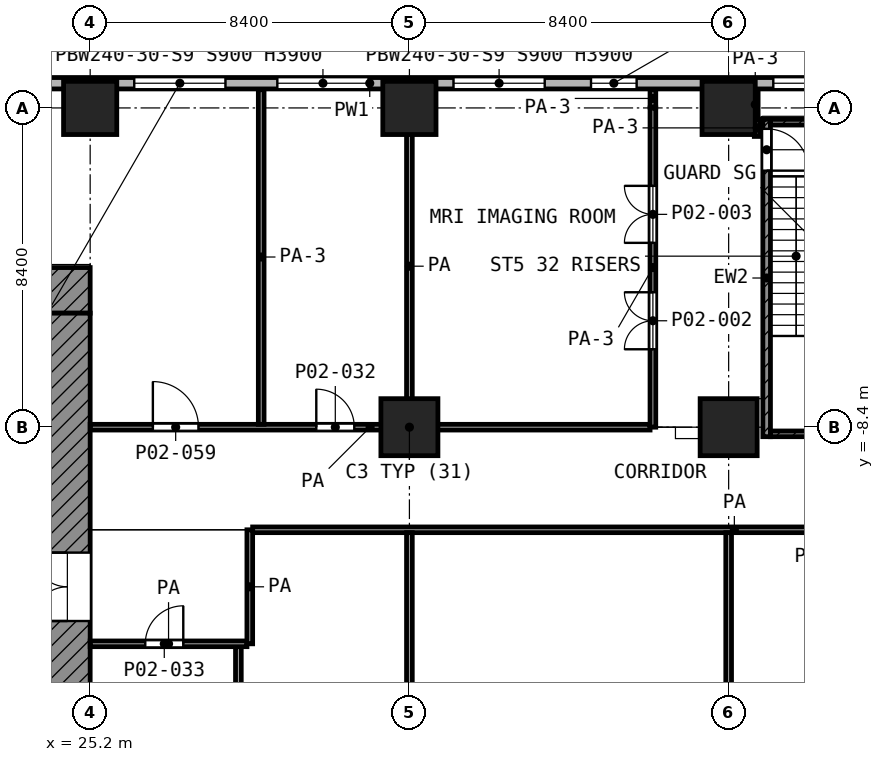
"""IFC4 building model, lengths in metres.
Left out: names, types, materials, properties, quantities, classifications, styles, units other than length and angle.
Written with IfcOpenShell. Run it as: python <this file> out.ifc"""

import sys

from ifc_helpers import new_model, si_unit, direction, frame, frame_2d, origin, origin_2d, place, context, subcontext, project, spatial, rectangle, extrude, element, fill, save


model = new_model("IFC4")
c1 = context("Model", 3, precision=1e-05, world=origin(), true_north=direction((0.0, 1.0)))
c2 = subcontext(c1, "Body", "Model", "MODEL_VIEW")
j1 = project(units=[si_unit("LENGTHUNIT", "METRE"), si_unit("PLANEANGLEUNIT", "RADIAN")], contexts=[c1])
p1 = place(None, origin())
s1 = spatial("IfcSite", under=j1, at=p1, CompositionType="ELEMENT")
p2 = place(p1, origin())
s2 = spatial("IfcBuilding", under=s1, at=p2, CompositionType="ELEMENT")
p3 = place(p2, frame((0.0, 0.0, 7.0)))
s3 = spatial("IfcBuildingStorey", under=s2, at=p3, CompositionType="ELEMENT", Elevation=7.0)
for number, where, z_axis, x_axis in (
    (1, (25.2, 0.0, 0.0), (0.0, 0.0, 1.0), (1.0, 0.0, 0.0)),
    (2, (33.6, 0.0, 0.0), (0.0, 0.0, 1.0), (1.0, 0.0, 0.0)),
    (3, (42.0, 0.0, 0.0), (0.0, 0.0, 1.0), (1.0, 0.0, 0.0)),
):
    element("IfcColumn", number, at=place(p3, frame(where, z_axis=z_axis, x_axis=x_axis)), inside=s3, PredefinedType="COLUMN", context=c2, shape_type="SweptSolid", body=[
        extrude(rectangle(XDim=1.4, YDim=1.4, at=origin_2d()), origin(), (0.0, 0.0, 1.0), 5.6),
    ])
for number, where, z_axis, x_axis in (
    (4, (33.6, -8.4, 0.0), (0.0, 0.0, 1.0), (1.0, 0.0, 0.0)),
    (5, (42.0, -8.4, 0.0), (0.0, 0.0, 1.0), (1.0, 0.0, 0.0)),
):
    element("IfcColumn", number, at=place(p3, frame(where, z_axis=z_axis, x_axis=x_axis)), inside=s3, PredefinedType="COLUMN", context=c2, shape_type="SweptSolid", body=[
        extrude(rectangle(XDim=1.5, YDim=1.5, at=origin_2d()), origin(), (0.0, 0.0, 1.0), 5.6),
    ])
p4 = place(p3, frame((59.85, 0.65, 0.0), z_axis=(0.0, 0.0, 1.0), x_axis=(-1.0, 0.0, 0.0)))
e6 = element("IfcWall", 6, at=p4, inside=s3, PredefinedType="SOLIDWALL", context=c2, shape_type="SweptSolid", body=[
    extrude(rectangle(XDim=54.588, YDim=0.3, at=frame_2d((27.294, 0.0))), origin(), (0.0, 0.0, 1.0), 5.25),
])
p5 = place(p4, frame((1.35, 0.0, 0.9)))
e7 = element("IfcOpeningElement", 7, at=p5, cuts=e6, PredefinedType="OPENING", context=c2, shape_type="SweptSolid", body=[
    extrude(rectangle(XDim=3.6, YDim=3.0, at=frame_2d((1.8, 1.5))), frame((0.0, 0.16, 0.0), z_axis=(0.0, -1.0, 0.0), x_axis=(1.0, 0.0, 0.0)), (0.0, 0.0, 1.0), 0.32),
])
p6 = place(p4, frame((5.89, 0.0, 0.9)))
e8 = element("IfcOpeningElement", 8, at=p6, cuts=e6, PredefinedType="OPENING", context=c2, shape_type="SweptSolid", body=[
    extrude(rectangle(XDim=2.4, YDim=3.0, at=frame_2d((1.2, 1.5))), frame((0.0, 0.16, 0.0), z_axis=(0.0, -1.0, 0.0), x_axis=(1.0, 0.0, 0.0)), (0.0, 0.0, 1.0), 0.32),
])
p7 = place(p4, frame((10.61, 0.0, 0.9)))
e9 = element("IfcOpeningElement", 9, at=p7, cuts=e6, PredefinedType="OPENING", context=c2, shape_type="SweptSolid", body=[
    extrude(rectangle(XDim=2.4, YDim=3.0, at=frame_2d((1.2, 1.5))), frame((0.0, 0.16, 0.0), z_axis=(0.0, -1.0, 0.0), x_axis=(1.0, 0.0, 0.0)), (0.0, 0.0, 1.0), 0.32),
])
p8 = place(p4, frame((14.275, 0.0, 0.9)))
e10 = element("IfcOpeningElement", 10, at=p8, cuts=e6, PredefinedType="OPENING", context=c2, shape_type="SweptSolid", body=[
    extrude(rectangle(XDim=2.4, YDim=3.0, at=frame_2d((1.2, 1.5))), frame((0.0, 0.16, 0.0), z_axis=(0.0, -1.0, 0.0), x_axis=(1.0, 0.0, 0.0)), (0.0, 0.0, 1.0), 0.32),
])
p9 = place(p4, frame((20.271, 0.0, 0.9)))
e11 = element("IfcOpeningElement", 11, at=p9, cuts=e6, PredefinedType="OPENING", context=c2, shape_type="SweptSolid", body=[
    extrude(rectangle(XDim=1.2, YDim=3.0, at=frame_2d((0.6, 1.5))), frame((0.0, 0.16, 0.0), z_axis=(0.0, -1.0, 0.0), x_axis=(1.0, 0.0, 0.0)), (0.0, 0.0, 1.0), 0.32),
])
p10 = place(p4, frame((22.69, 0.0, 0.9)))
e12 = element("IfcOpeningElement", 12, at=p10, cuts=e6, PredefinedType="OPENING", context=c2, shape_type="SweptSolid", body=[
    extrude(rectangle(XDim=2.4, YDim=3.0, at=frame_2d((1.2, 1.5))), frame((0.0, 0.16, 0.0), z_axis=(0.0, -1.0, 0.0), x_axis=(1.0, 0.0, 0.0)), (0.0, 0.0, 1.0), 0.32),
])
p11 = place(p4, frame((27.325, 0.0, 0.9)))
e13 = element("IfcOpeningElement", 13, at=p11, cuts=e6, PredefinedType="OPENING", context=c2, shape_type="SweptSolid", body=[
    extrude(rectangle(XDim=2.4, YDim=3.0, at=frame_2d((1.2, 1.5))), frame((0.0, 0.16, 0.0), z_axis=(0.0, -1.0, 0.0), x_axis=(1.0, 0.0, 0.0)), (0.0, 0.0, 1.0), 0.32),
])
p12 = place(p4, frame((31.09, 0.0, 0.9)))
e14 = element("IfcOpeningElement", 14, at=p12, cuts=e6, PredefinedType="OPENING", context=c2, shape_type="SweptSolid", body=[
    extrude(rectangle(XDim=2.4, YDim=3.0, at=frame_2d((1.2, 1.5))), frame((0.0, 0.16, 0.0), z_axis=(0.0, -1.0, 0.0), x_axis=(1.0, 0.0, 0.0)), (0.0, 0.0, 1.0), 0.32),
])
p13 = place(p4, frame((35.81, 0.0, 0.9)))
e15 = element("IfcOpeningElement", 15, at=p13, cuts=e6, PredefinedType="OPENING", context=c2, shape_type="SweptSolid", body=[
    extrude(rectangle(XDim=2.4, YDim=3.0, at=frame_2d((1.2, 1.5))), frame((0.0, 0.16, 0.0), z_axis=(0.0, -1.0, 0.0), x_axis=(1.0, 0.0, 0.0)), (0.0, 0.0, 1.0), 0.32),
])
p14 = place(p4, frame((39.49, 0.0, 0.9)))
e16 = element("IfcOpeningElement", 16, at=p14, cuts=e6, PredefinedType="OPENING", context=c2, shape_type="SweptSolid", body=[
    extrude(rectangle(XDim=2.4, YDim=3.0, at=frame_2d((1.2, 1.5))), frame((0.0, 0.16, 0.0), z_axis=(0.0, -1.0, 0.0), x_axis=(1.0, 0.0, 0.0)), (0.0, 0.0, 1.0), 0.32),
])
p15 = place(p4, frame((44.21, 0.0, 0.9)))
e17 = element("IfcOpeningElement", 17, at=p15, cuts=e6, PredefinedType="OPENING", context=c2, shape_type="SweptSolid", body=[
    extrude(rectangle(XDim=2.4, YDim=3.0, at=frame_2d((1.2, 1.5))), frame((0.0, 0.16, 0.0), z_axis=(0.0, -1.0, 0.0), x_axis=(1.0, 0.0, 0.0)), (0.0, 0.0, 1.0), 0.32),
])
p16 = place(p4, frame((47.55, 0.0, 0.9)))
e18 = element("IfcOpeningElement", 18, at=p16, cuts=e6, PredefinedType="OPENING", context=c2, shape_type="SweptSolid", body=[
    extrude(rectangle(XDim=3.6, YDim=3.0, at=frame_2d((1.8, 1.5))), frame((0.0, 0.16, 0.0), z_axis=(0.0, -1.0, 0.0), x_axis=(1.0, 0.0, 0.0)), (0.0, 0.0, 1.0), 0.32),
])
p17 = place(p4, frame((51.778, 0.0, 0.9)))
e19 = element("IfcOpeningElement", 19, at=p17, cuts=e6, PredefinedType="OPENING", context=c2, shape_type="SweptSolid", body=[
    extrude(rectangle(XDim=1.2, YDim=3.0, at=frame_2d((0.6, 1.5))), frame((0.0, 0.16, 0.0), z_axis=(0.0, -1.0, 0.0), x_axis=(1.0, 0.0, 0.0)), (0.0, 0.0, 1.0), 0.32),
])
p18 = place(p3, frame((4.2, -4.8, 0.0), z_axis=(0.0, 0.0, 1.0), x_axis=(1.0, 0.0, 0.0)))
e20 = element("IfcWall", 20, at=p18, inside=s3, PredefinedType="SHEAR", context=c2, shape_type="SweptSolid", body=[
    extrude(rectangle(XDim=21.0, YDim=1.2, at=frame_2d((10.5, 0.0))), origin(), (0.0, 0.0, 1.0), 5.25),
])
p19 = place(p18, frame((1.95, 0.0, 0.0)))
e21 = element("IfcOpeningElement", 21, at=p19, cuts=e20, PredefinedType="OPENING", context=c2, shape_type="SweptSolid", body=[
    extrude(rectangle(XDim=1.1, YDim=2.1, at=frame_2d((0.55, 1.05))), frame((0.0, 0.61, 0.0), z_axis=(0.0, -1.0, 0.0), x_axis=(1.0, 0.0, 0.0)), (0.0, 0.0, 1.0), 1.22),
])
p20 = place(p18, frame((17.95, 0.0, 0.0)))
e22 = element("IfcOpeningElement", 22, at=p20, cuts=e20, PredefinedType="OPENING", context=c2, shape_type="SweptSolid", body=[
    extrude(rectangle(XDim=1.1, YDim=2.1, at=frame_2d((0.55, 1.05))), frame((0.0, 0.61, 0.0), z_axis=(0.0, -1.0, 0.0), x_axis=(1.0, 0.0, 0.0)), (0.0, 0.0, 1.0), 1.22),
])
p21 = place(p3, frame((24.6, -24.0, 0.0), z_axis=(0.0, 0.0, 1.0), x_axis=(0.0, 1.0, 0.0)))
e23 = element("IfcWall", 23, at=p21, inside=s3, PredefinedType="SHEAR", context=c2, shape_type="SweptSolid", body=[
    extrude(rectangle(XDim=18.6, YDim=1.2, at=frame_2d((9.3, 0.0))), origin(), (0.0, 0.0, 1.0), 5.25),
])
p22 = place(p21, frame((10.5, 0.0, 0.0)))
e24 = element("IfcOpeningElement", 24, at=p22, cuts=e23, PredefinedType="OPENING", context=c2, shape_type="SweptSolid", body=[
    extrude(rectangle(XDim=1.8, YDim=2.1, at=frame_2d((0.9, 1.05))), frame((0.0, 0.61, 0.0), z_axis=(0.0, -1.0, 0.0), x_axis=(1.0, 0.0, 0.0)), (0.0, 0.0, 1.0), 1.22),
])
p23 = place(p3, frame((43.0, -8.65, 0.0), z_axis=(0.0, 0.0, 1.0), x_axis=(0.0, 1.0, 0.0)))
e25 = element("IfcWall", 25, at=p23, inside=s3, PredefinedType="SHEAR", context=c2, shape_type="SweptSolid", body=[
    extrude(rectangle(XDim=8.35, YDim=0.2, at=frame_2d((4.175, 0.0))), origin(), (0.0, 0.0, 1.0), 5.25),
])
p24 = place(p23, frame((7.0, 0.0, 0.0)))
e26 = element("IfcOpeningElement", 26, at=p24, cuts=e25, PredefinedType="OPENING", context=c2, shape_type="SweptSolid", body=[
    extrude(rectangle(XDim=1.1, YDim=2.1, at=frame_2d((0.55, 1.05))), frame((0.0, 0.11, 0.0), z_axis=(0.0, -1.0, 0.0), x_axis=(1.0, 0.0, 0.0)), (0.0, 0.0, 1.0), 0.22),
])
for number, where, z_axis, x_axis in (
    (27, (43.1, -0.375, 0.0), (0.0, 0.0, 1.0), (1.0, 0.0, 0.0)),
    (28, (43.1, -8.575, 0.0), (0.0, 0.0, 1.0), (1.0, 0.0, 0.0)),
):
    element("IfcWall", number, at=place(p3, frame(where, z_axis=z_axis, x_axis=x_axis)), inside=s3, PredefinedType="SHEAR", context=c2, shape_type="SweptSolid", body=[
        extrude(rectangle(XDim=2.85, YDim=0.15, at=frame_2d((1.425, 0.0))), origin(), (0.0, 0.0, 1.0), 5.25),
    ])
p25 = place(p3, frame((25.2, -14.1, 0.0), z_axis=(0.0, 0.0, 1.0), x_axis=(1.0, 0.0, 0.0)))
e29 = element("IfcWall", 29, at=p25, inside=s3, PredefinedType="PARTITIONING", context=c2, shape_type="SweptSolid", body=[
    extrude(rectangle(XDim=4.125, YDim=0.15, at=frame_2d((2.062, 0.0))), origin(), (0.0, 0.0, 1.0), 5.25),
])
p26 = place(p25, frame((1.45, 0.0, 0.0)))
e30 = element("IfcOpeningElement", 30, at=p26, cuts=e29, PredefinedType="OPENING", context=c2, shape_type="SweptSolid", body=[
    extrude(rectangle(XDim=1.0, YDim=2.1, at=frame_2d((0.5, 1.05))), frame((0.0, 0.085, 0.0), z_axis=(0.0, -1.0, 0.0), x_axis=(1.0, 0.0, 0.0)), (0.0, 0.0, 1.0), 0.17),
])
p27 = place(p3, frame((29.475, -11.1, 0.0), z_axis=(0.0, 0.0, 1.0), x_axis=(1.0, 0.0, 0.0)))
e31 = element("IfcWall", 31, at=p27, inside=s3, PredefinedType="PARTITIONING", context=c2, shape_type="SweptSolid", body=[
    extrude(rectangle(XDim=25.35, YDim=0.15, at=frame_2d((12.675, 0.0))), origin(), (0.0, 0.0, 1.0), 5.25),
])
p28 = place(p27, frame((17.375, 0.0, 0.0)))
e32 = element("IfcOpeningElement", 32, at=p28, cuts=e31, PredefinedType="OPENING", context=c2, shape_type="SweptSolid", body=[
    extrude(rectangle(XDim=1.5, YDim=2.1, at=frame_2d((0.75, 1.05))), frame((0.0, 0.085, 0.0), z_axis=(0.0, -1.0, 0.0), x_axis=(1.0, 0.0, 0.0)), (0.0, 0.0, 1.0), 0.17),
])
p29 = place(p27, frame((14.575, 0.0, 0.0)))
e33 = element("IfcOpeningElement", 33, at=p29, cuts=e31, PredefinedType="OPENING", context=c2, shape_type="SweptSolid", body=[
    extrude(rectangle(XDim=1.5, YDim=2.1, at=frame_2d((0.75, 1.05))), frame((0.0, 0.085, 0.0), z_axis=(0.0, -1.0, 0.0), x_axis=(1.0, 0.0, 0.0)), (0.0, 0.0, 1.0), 0.17),
])
p30 = place(p3, frame((25.2, -8.4, 0.0), z_axis=(0.0, 0.0, 1.0), x_axis=(1.0, 0.0, 0.0)))
e34 = element("IfcWall", 34, at=p30, inside=s3, PredefinedType="PARTITIONING", context=c2, shape_type="SweptSolid", body=[
    extrude(rectangle(XDim=14.732, YDim=0.15, at=frame_2d((7.366, 0.0))), origin(), (0.0, 0.0, 1.0), 5.25),
])
p31 = place(p30, frame((1.65, 0.0, 0.0)))
e35 = element("IfcOpeningElement", 35, at=p31, cuts=e34, PredefinedType="OPENING", context=c2, shape_type="SweptSolid", body=[
    extrude(rectangle(XDim=1.2, YDim=2.1, at=frame_2d((0.6, 1.05))), frame((0.0, 0.085, 0.0), z_axis=(0.0, -1.0, 0.0), x_axis=(1.0, 0.0, 0.0)), (0.0, 0.0, 1.0), 0.17),
])
p32 = place(p30, frame((5.95, 0.0, 0.0)))
e36 = element("IfcOpeningElement", 36, at=p32, cuts=e34, PredefinedType="OPENING", context=c2, shape_type="SweptSolid", body=[
    extrude(rectangle(XDim=1.0, YDim=2.1, at=frame_2d((0.5, 1.05))), frame((0.0, 0.085, 0.0), z_axis=(0.0, -1.0, 0.0), x_axis=(1.0, 0.0, 0.0)), (0.0, 0.0, 1.0), 0.17),
])
p33 = place(p3, frame((29.1, -22.425, 0.0), z_axis=(0.0, 0.0, 1.0), x_axis=(0.0, 1.0, 0.0)))
e37 = element("IfcWall", 37, at=p33, inside=s3, PredefinedType="PARTITIONING", context=c2, shape_type="SweptSolid", body=[
    extrude(rectangle(XDim=8.25, YDim=0.15, at=frame_2d((4.125, 0.0))), origin(), (0.0, 0.0, 1.0), 5.25),
])
p34 = place(p3, frame((29.4, -14.1, 0.0), z_axis=(0.0, 0.0, 1.0), x_axis=(0.0, 1.0, 0.0)))
e38 = element("IfcWall", 38, at=p34, inside=s3, PredefinedType="PARTITIONING", context=c2, shape_type="SweptSolid", body=[
    extrude(rectangle(XDim=3.0, YDim=0.15, at=frame_2d((1.5, 0.0))), origin(), (0.0, 0.0, 1.0), 5.25),
])
p35 = place(p3, frame((29.7, -8.325, 0.0), z_axis=(0.0, 0.0, 1.0), x_axis=(0.0, 1.0, 0.0)))
e39 = element("IfcWall", 39, at=p35, inside=s3, PredefinedType="PARTITIONING", context=c2, shape_type="SweptSolid", body=[
    extrude(rectangle(XDim=8.805, YDim=0.15, at=frame_2d((4.402, 0.0))), origin(), (0.0, 0.0, 1.0), 3.85),
])
p36 = place(p3, frame((33.6, -22.425, 0.0), z_axis=(0.0, 0.0, 1.0), x_axis=(0.0, 1.0, 0.0)))
e40 = element("IfcWall", 40, at=p36, inside=s3, PredefinedType="PARTITIONING", context=c2, shape_type="SweptSolid", body=[
    extrude(rectangle(XDim=11.25, YDim=0.15, at=frame_2d((5.625, 0.0))), origin(), (0.0, 0.0, 1.0), 5.25),
])
p37 = place(p3, frame((33.6, -8.325, 0.0), z_axis=(0.0, 0.0, 1.0), x_axis=(0.0, 1.0, 0.0)))
e41 = element("IfcWall", 41, at=p37, inside=s3, PredefinedType="PARTITIONING", context=c2, shape_type="SweptSolid", body=[
    extrude(rectangle(XDim=8.322, YDim=0.15, at=frame_2d((4.161, 0.0))), origin(), (0.0, 0.0, 1.0), 5.25),
])
p38 = place(p3, frame((40.007, -8.4, 0.0), z_axis=(0.0, 0.0, 1.0), x_axis=(0.0, 1.0, 0.0)))
e42 = element("IfcWall", 42, at=p38, inside=s3, PredefinedType="PARTITIONING", context=c2, shape_type="SweptSolid", body=[
    extrude(rectangle(XDim=8.4, YDim=0.15, at=frame_2d((4.2, 0.0))), origin(), (0.0, 0.0, 1.0), 3.85),
])
p39 = place(p38, frame((2.05, 0.0, 0.0)))
e43 = element("IfcOpeningElement", 43, at=p39, cuts=e42, PredefinedType="OPENING", context=c2, shape_type="SweptSolid", body=[
    extrude(rectangle(XDim=1.5, YDim=2.1, at=frame_2d((0.75, 1.05))), frame((0.0, 0.085, 0.0), z_axis=(0.0, -1.0, 0.0), x_axis=(1.0, 0.0, 0.0)), (0.0, 0.0, 1.0), 0.17),
])
p40 = place(p38, frame((4.85, 0.0, 0.0)))
e44 = element("IfcOpeningElement", 44, at=p40, cuts=e42, PredefinedType="OPENING", context=c2, shape_type="SweptSolid", body=[
    extrude(rectangle(XDim=1.5, YDim=2.1, at=frame_2d((0.75, 1.05))), frame((0.0, 0.085, 0.0), z_axis=(0.0, -1.0, 0.0), x_axis=(1.0, 0.0, 0.0)), (0.0, 0.0, 1.0), 0.17),
])
p41 = place(p3, frame((40.007, 0.02, 0.0), z_axis=(0.0, 0.0, 1.0), x_axis=(0.0, 1.0, 0.0)))
e45 = element("IfcWall", 45, at=p41, inside=s3, PredefinedType="PARTITIONING", context=c2, shape_type="SweptSolid", body=[
    extrude(rectangle(XDim=0.46, YDim=0.15, at=frame_2d((0.23, 0.0))), origin(), (0.0, 0.0, 1.0), 3.85),
])
p42 = place(p3, frame((42.0, -22.425, 0.0), z_axis=(0.0, 0.0, 1.0), x_axis=(0.0, 1.0, 0.0)))
e46 = element("IfcWall", 46, at=p42, inside=s3, PredefinedType="PARTITIONING", context=c2, shape_type="SweptSolid", body=[
    extrude(rectangle(XDim=11.25, YDim=0.15, at=frame_2d((5.625, 0.0))), origin(), (0.0, 0.0, 1.0), 5.25),
])
p43 = place(p3, frame((42.7, -0.3, 0.0), z_axis=(0.0, 0.0, 1.0), x_axis=(0.0, 1.0, 0.0)))
e47 = element("IfcWall", 47, at=p43, inside=s3, PredefinedType="PARTITIONING", context=c2, shape_type="SweptSolid", body=[
    extrude(rectangle(XDim=0.78, YDim=0.15, at=frame_2d((0.39, 0.0))), origin(), (0.0, 0.0, 1.0), 3.85),
])
p44 = place(p3, frame((42.75, -0.75, 0.0), z_axis=(0.0, 0.0, 1.0), x_axis=(0.0, 1.0, 0.0)))
e48 = element("IfcWall", 48, at=p44, inside=s3, PredefinedType="PARTITIONING", context=c2, shape_type="SweptSolid", body=[
    extrude(rectangle(XDim=0.45, YDim=0.15, at=frame_2d((0.225, 0.0))), origin(), (0.0, 0.0, 1.0), 3.85),
])
p45 = place(p8, origin())
e49 = element("IfcWindow", 49, at=p45, inside=s3, PartitioningType="SINGLE_PANEL", PredefinedType="WINDOW", context=c2, shape_type="SweptSolid", body=[
    extrude(rectangle(XDim=2.4, YDim=3.0, at=frame_2d((1.2, 1.5))), frame((0.0, 0.03, 0.0), z_axis=(0.0, -1.0, 0.0), x_axis=(1.0, 0.0, 0.0)), (0.0, 0.0, 1.0), 0.06),
])
fill(e10, e49)
p46 = place(p9, origin())
e50 = element("IfcWindow", 50, at=p46, inside=s3, PartitioningType="SINGLE_PANEL", PredefinedType="WINDOW", context=c2, shape_type="SweptSolid", body=[
    extrude(rectangle(XDim=1.2, YDim=3.0, at=frame_2d((0.6, 1.5))), frame((0.0, 0.03, 0.0), z_axis=(0.0, -1.0, 0.0), x_axis=(1.0, 0.0, 0.0)), (0.0, 0.0, 1.0), 0.06),
])
fill(e11, e50)
p47 = place(p10, origin())
e51 = element("IfcWindow", 51, at=p47, inside=s3, PartitioningType="SINGLE_PANEL", PredefinedType="WINDOW", context=c2, shape_type="SweptSolid", body=[
    extrude(rectangle(XDim=2.4, YDim=3.0, at=frame_2d((1.2, 1.5))), frame((0.0, 0.03, 0.0), z_axis=(0.0, -1.0, 0.0), x_axis=(1.0, 0.0, 0.0)), (0.0, 0.0, 1.0), 0.06),
])
fill(e12, e51)
p48 = place(p11, origin())
e52 = element("IfcWindow", 52, at=p48, inside=s3, PartitioningType="SINGLE_PANEL", PredefinedType="WINDOW", context=c2, shape_type="SweptSolid", body=[
    extrude(rectangle(XDim=2.4, YDim=3.0, at=frame_2d((1.2, 1.5))), frame((0.0, 0.03, 0.0), z_axis=(0.0, -1.0, 0.0), x_axis=(1.0, 0.0, 0.0)), (0.0, 0.0, 1.0), 0.06),
])
fill(e13, e52)
p49 = place(p12, origin())
e53 = element("IfcWindow", 53, at=p49, inside=s3, PartitioningType="SINGLE_PANEL", PredefinedType="WINDOW", context=c2, shape_type="SweptSolid", body=[
    extrude(rectangle(XDim=2.4, YDim=3.0, at=frame_2d((1.2, 1.5))), frame((0.0, 0.03, 0.0), z_axis=(0.0, -1.0, 0.0), x_axis=(1.0, 0.0, 0.0)), (0.0, 0.0, 1.0), 0.06),
])
fill(e14, e53)
p50 = place(p22, origin())
e54 = element("IfcDoor", 54, at=p50, inside=s3, OperationType="DOUBLE_DOOR_SINGLE_SWING", PredefinedType="DOOR", context=c2, shape_type="SweptSolid", body=[
    extrude(rectangle(XDim=1.8, YDim=2.1, at=frame_2d((0.9, 1.05))), frame((0.0, 0.025, 0.0), z_axis=(0.0, -1.0, 0.0), x_axis=(1.0, 0.0, 0.0)), (0.0, 0.0, 1.0), 0.05),
])
fill(e24, e54)
p51 = place(p24, frame((1.1, 0.0, 0.0), z_axis=(0.0, 0.0, 1.0), x_axis=(-1.0, 0.0, 0.0)))
e55 = element("IfcDoor", 55, at=p51, inside=s3, OperationType="SINGLE_SWING_LEFT", PredefinedType="DOOR", context=c2, shape_type="SweptSolid", body=[
    extrude(rectangle(XDim=1.1, YDim=2.1, at=frame_2d((0.55, 1.05))), frame((0.0, 0.025, 0.0), z_axis=(0.0, -1.0, 0.0), x_axis=(1.0, 0.0, 0.0)), (0.0, 0.0, 1.0), 0.05),
])
fill(e26, e55)
p52 = place(p31, origin())
e56 = element("IfcDoor", 56, at=p52, inside=s3, OperationType="SINGLE_SWING_LEFT", PredefinedType="DOOR", context=c2, shape_type="SweptSolid", body=[
    extrude(rectangle(XDim=1.2, YDim=2.1, at=frame_2d((0.6, 1.05))), frame((0.0, 0.025, 0.0), z_axis=(0.0, -1.0, 0.0), x_axis=(1.0, 0.0, 0.0)), (0.0, 0.0, 1.0), 0.05),
])
fill(e35, e56)
p53 = place(p32, origin())
e57 = element("IfcDoor", 57, at=p53, inside=s3, OperationType="SINGLE_SWING_LEFT", PredefinedType="DOOR", context=c2, shape_type="SweptSolid", body=[
    extrude(rectangle(XDim=1.0, YDim=2.1, at=frame_2d((0.5, 1.05))), frame((0.0, 0.025, 0.0), z_axis=(0.0, -1.0, 0.0), x_axis=(1.0, 0.0, 0.0)), (0.0, 0.0, 1.0), 0.05),
])
fill(e36, e57)
p54 = place(p39, origin())
e58 = element("IfcDoor", 58, at=p54, inside=s3, OperationType="DOUBLE_DOOR_SINGLE_SWING", PredefinedType="DOOR", context=c2, shape_type="SweptSolid", body=[
    extrude(rectangle(XDim=1.5, YDim=2.1, at=frame_2d((0.75, 1.05))), frame((0.0, 0.025, 0.0), z_axis=(0.0, -1.0, 0.0), x_axis=(1.0, 0.0, 0.0)), (0.0, 0.0, 1.0), 0.05),
])
fill(e43, e58)
p55 = place(p40, origin())
e59 = element("IfcDoor", 59, at=p55, inside=s3, OperationType="DOUBLE_DOOR_SINGLE_SWING", PredefinedType="DOOR", context=c2, shape_type="SweptSolid", body=[
    extrude(rectangle(XDim=1.5, YDim=2.1, at=frame_2d((0.75, 1.05))), frame((0.0, 0.025, 0.0), z_axis=(0.0, -1.0, 0.0), x_axis=(1.0, 0.0, 0.0)), (0.0, 0.0, 1.0), 0.05),
])
fill(e44, e59)
p56 = place(p26, origin())
e60 = element("IfcDoor", 60, at=p56, inside=s3, OperationType="SINGLE_SWING_RIGHT", PredefinedType="DOOR", context=c2, shape_type="SweptSolid", body=[
    extrude(rectangle(XDim=1.0, YDim=2.1, at=frame_2d((0.5, 1.05))), frame((0.0, 0.025, 0.0), z_axis=(0.0, -1.0, 0.0), x_axis=(1.0, 0.0, 0.0)), (0.0, 0.0, 1.0), 0.05),
])
fill(e30, e60)
save(model, sys.argv[1])
